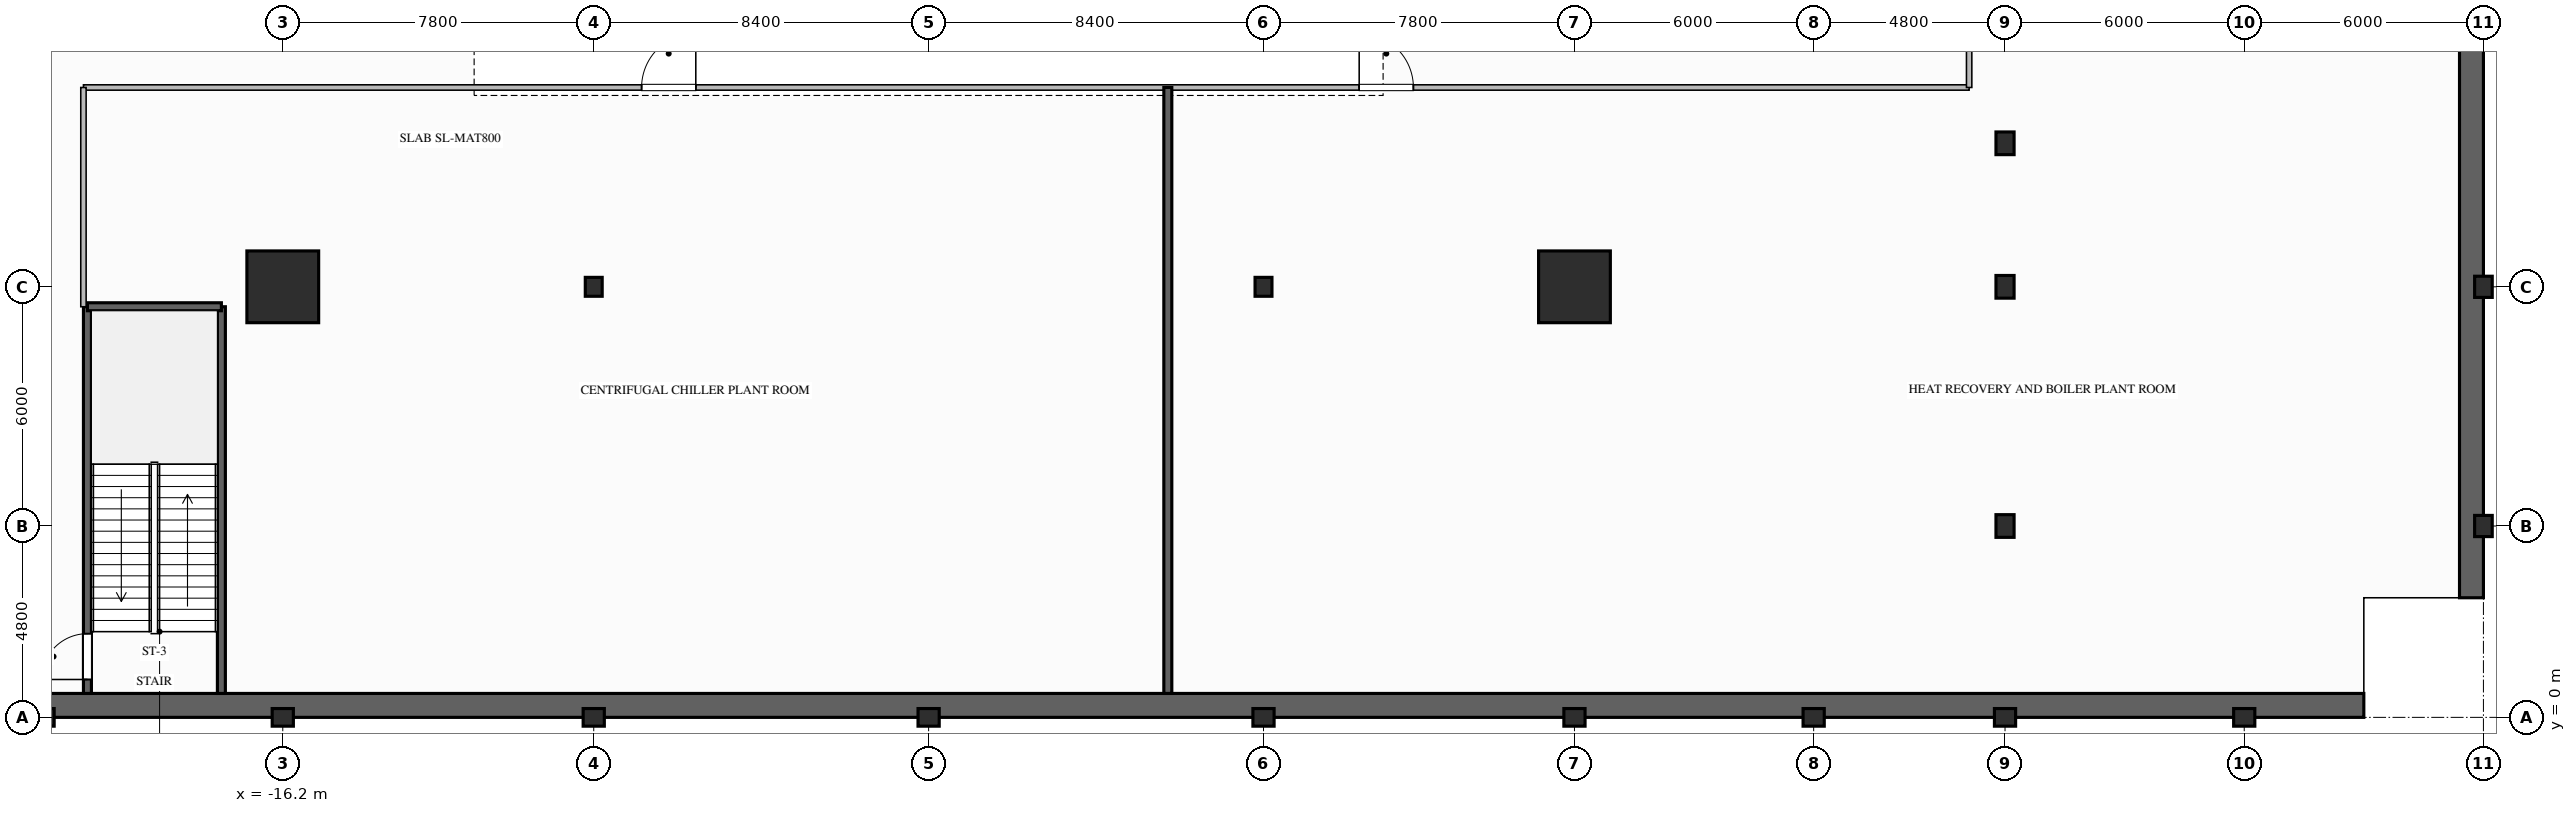
"""IFC4 building model, lengths in metres.
Left out: names, types, materials, properties, quantities, classifications, styles, units other than length and angle.
Written with IfcOpenShell. Run it as: python <this file> out.ifc"""

import sys

from ifc_helpers import new_model, si_unit, direction, frame, frame_2d, origin, origin_2d, place, context, subcontext, project, spatial, rectangle, i_section, extrude, element, fill, save


model = new_model("IFC4")
c1 = context("Model", 3, precision=1e-05, world=origin(), true_north=direction((0.0, 1.0)))
c2 = subcontext(c1, "Body", "Model", "MODEL_VIEW")
j1 = project(units=[si_unit("LENGTHUNIT", "METRE"), si_unit("PLANEANGLEUNIT", "RADIAN")], contexts=[c1])
p1 = place(None, origin())
s1 = spatial("IfcSite", under=j1, at=p1, CompositionType="ELEMENT")
p2 = place(p1, origin())
s2 = spatial("IfcBuilding", under=s1, at=p2, CompositionType="ELEMENT")
p3 = place(p2, frame((0.0, 0.0, -10.8)))
s3 = spatial("IfcBuildingStorey", under=s2, at=p3, CompositionType="ELEMENT", Elevation=-10.8)
p4 = place(p3, frame((38.7, 51.0, 0.0), z_axis=(0.0, 0.0, 1.0), x_axis=(0.0, -1.0, 0.0)))
e1 = element("IfcWall", 1, at=p4, inside=s3, PredefinedType="USERDEFINED", context=c2, shape_type="SweptSolid", body=[
    extrude(rectangle(XDim=48.0, YDim=0.6, at=frame_2d((24.0, 0.0))), origin(), (0.0, 0.0, 1.0), 5.05),
])
p5 = place(p3, frame((36.0, 0.3, 0.0), z_axis=(0.0, 0.0, 1.0), x_axis=(-1.0, 0.0, 0.0)))
e2 = element("IfcWall", 2, at=p5, inside=s3, PredefinedType="USERDEFINED", context=c2, shape_type="SweptSolid", body=[
    extrude(rectangle(XDim=60.0, YDim=0.6, at=frame_2d((30.0, 0.0))), origin(), (0.0, 0.0, 1.0), 5.05),
])
for number, where, z_axis, x_axis in (
    (3, (-16.2, 10.8, 0.0), (0.0, 0.0, 1.0), (1.0, 0.0, 0.0)),
    (4, (16.2, 10.8, 0.0), (0.0, 0.0, 1.0), (1.0, 0.0, 0.0)),
):
    element("IfcColumn", number, at=place(p3, frame(where, z_axis=z_axis, x_axis=x_axis)), inside=s3, PredefinedType="COLUMN", context=c2, shape_type="SweptSolid", body=[
        extrude(rectangle(XDim=1.8, YDim=1.8, at=origin_2d()), origin(), (0.0, 0.0, 1.0), 5.4),
    ])
for number, where, z_axis, x_axis in (
    (5, (39.0, 4.8, 0.0), (0.0, 0.0, 1.0), (1.0, 0.0, 0.0)),
    (6, (39.0, 10.8, 0.0), (0.0, 0.0, 1.0), (1.0, 0.0, 0.0)),
    (7, (-22.2, 0.0, 0.0), (0.0, 0.0, 1.0), (0.0, 1.0, 0.0)),
    (8, (-16.2, 0.0, 0.0), (0.0, 0.0, 1.0), (0.0, 1.0, 0.0)),
    (9, (-8.4, 0.0, 0.0), (0.0, 0.0, 1.0), (0.0, 1.0, 0.0)),
    (10, (0.0, 0.0, 0.0), (0.0, 0.0, 1.0), (0.0, 1.0, 0.0)),
    (11, (8.4, 0.0, 0.0), (0.0, 0.0, 1.0), (0.0, 1.0, 0.0)),
    (12, (16.2, 0.0, 0.0), (0.0, 0.0, 1.0), (0.0, 1.0, 0.0)),
    (13, (22.2, 0.0, 0.0), (0.0, 0.0, 1.0), (0.0, 1.0, 0.0)),
    (14, (27.0, 0.0, 0.0), (0.0, 0.0, 1.0), (0.0, 1.0, 0.0)),
    (15, (33.0, 0.0, 0.0), (0.0, 0.0, 1.0), (0.0, 1.0, 0.0)),
):
    element("IfcColumn", number, at=place(p3, frame(where, z_axis=z_axis, x_axis=x_axis)), inside=s3, PredefinedType="COLUMN", context=c2, shape_type="SweptSolid", body=[
        extrude(i_section(OverallWidth=0.442, OverallDepth=0.531, WebThickness=0.066, FlangeThickness=0.106, FilletRadius=0.03, at=origin_2d()), origin(), (0.0, 0.0, 1.0), 5.4),
    ])
for number, where, z_axis, x_axis in (
    (16, (27.0, 4.8, 0.0), (0.0, 0.0, 1.0), (1.0, 0.0, 0.0)),
    (17, (27.0, 10.8, 0.0), (0.0, 0.0, 1.0), (1.0, 0.0, 0.0)),
    (18, (27.0, 14.4, 0.0), (0.0, 0.0, 1.0), (1.0, 0.0, 0.0)),
):
    element("IfcColumn", number, at=place(p3, frame(where, z_axis=z_axis, x_axis=x_axis)), inside=s3, PredefinedType="COLUMN", context=c2, shape_type="SweptSolid", body=[
        extrude(i_section(OverallWidth=0.454, OverallDepth=0.569, WebThickness=0.078, FlangeThickness=0.125, FilletRadius=0.03, at=origin_2d()), origin(), (0.0, 0.0, 1.0), 5.4),
    ])
for number, where, z_axis, x_axis in (
    (19, (-8.4, 10.8, 0.0), (0.0, 0.0, 1.0), (1.0, 0.0, 0.0)),
    (20, (8.4, 10.8, 0.0), (0.0, 0.0, 1.0), (1.0, 0.0, 0.0)),
):
    element("IfcColumn", number, at=place(p3, frame(where, z_axis=z_axis, x_axis=x_axis)), inside=s3, PredefinedType="COLUMN", context=c2, shape_type="SweptSolid", body=[
        extrude(i_section(OverallWidth=0.424, OverallDepth=0.474, WebThickness=0.048, FlangeThickness=0.077, FilletRadius=0.03, at=origin_2d()), origin(), (0.0, 0.0, 1.0), 5.4),
    ])
p6 = place(p2, frame((0.0, 0.0, -5.4)))
s4 = spatial("IfcBuildingStorey", under=s2, at=p6, CompositionType="ELEMENT", Elevation=-5.4)
p7 = place(p6, frame((39.0, 3.45, -5.4), z_axis=(0.0, 0.0, 1.0), x_axis=(1.0, 0.0, 0.0)))
e21 = element("IfcWall", 21, at=p7, inside=s4, PredefinedType="USERDEFINED", context=c2, shape_type="SweptSolid", body=[
    extrude(rectangle(XDim=5.825, YDim=0.45, at=frame_2d((2.913, 0.0))), origin(), (0.0, 0.0, 1.0), 10.62),
])
p8 = place(p6, frame((35.55, -2.325, -5.4), z_axis=(0.0, 0.0, 1.0), x_axis=(0.0, 1.0, 0.0)))
e22 = element("IfcWall", 22, at=p8, inside=s4, PredefinedType="USERDEFINED", context=c2, shape_type="SweptSolid", body=[
    extrude(rectangle(XDim=2.325, YDim=0.45, at=frame_2d((1.163, 0.0))), origin(), (0.0, 0.0, 1.0), 10.62),
])
p9 = place(p3, frame((-21.1, 0.6, 0.0), z_axis=(0.0, 0.0, 1.0), x_axis=(0.0, 1.0, 0.0)))
e23 = element("IfcWall", 23, at=p9, inside=s3, PredefinedType="SOLIDWALL", context=c2, shape_type="SweptSolid", body=[
    extrude(rectangle(XDim=9.7, YDim=0.2, at=frame_2d((4.85, 0.0))), origin(), (0.0, 0.0, 1.0), 5.05),
])
p10 = place(p9, frame((0.35, 0.0, 0.0)))
e24 = element("IfcOpeningElement", 24, at=p10, cuts=e23, PredefinedType="OPENING", context=c2, shape_type="SweptSolid", body=[
    extrude(rectangle(XDim=1.15, YDim=2.15, at=frame_2d((0.575, 1.075))), frame((0.0, 0.11, 0.0), z_axis=(0.0, -1.0, 0.0), x_axis=(1.0, 0.0, 0.0)), (0.0, 0.0, 1.0), 0.22),
])
p11 = place(p3, frame((-17.74, 10.3, 0.0), z_axis=(0.0, 0.0, 1.0), x_axis=(0.0, -1.0, 0.0)))
e25 = element("IfcWall", 25, at=p11, inside=s3, PredefinedType="SOLIDWALL", context=c2, shape_type="SweptSolid", body=[
    extrude(rectangle(XDim=9.7, YDim=0.2, at=frame_2d((4.85, 0.0))), origin(), (0.0, 0.0, 1.0), 5.05),
])
p12 = place(p3, frame((-17.74, 10.3, 0.0), z_axis=(0.0, 0.0, 1.0), x_axis=(-1.0, 0.0, 0.0)))
e26 = element("IfcWall", 26, at=p12, inside=s3, PredefinedType="SOLIDWALL", context=c2, shape_type="SweptSolid", body=[
    extrude(rectangle(XDim=3.36, YDim=0.2, at=frame_2d((1.68, 0.0))), origin(), (0.0, 0.0, 1.0), 5.05),
])
p13 = place(p3, frame((-21.2, 15.8, 0.0), z_axis=(0.0, 0.0, 1.0), x_axis=(1.0, 0.0, 0.0)))
e27 = element("IfcWall", 27, at=p13, inside=s3, PredefinedType="PARTITIONING", context=c2, shape_type="SweptSolid", body=[
    extrude(rectangle(XDim=47.3, YDim=0.135, at=frame_2d((23.65, 0.0))), origin(), (0.0, 0.0, 1.0), 5.05),
])
p14 = place(p13, frame((14.0, 0.0, 0.0)))
e28 = element("IfcOpeningElement", 28, at=p14, cuts=e27, PredefinedType="OPENING", context=c2, shape_type="SweptSolid", body=[
    extrude(rectangle(XDim=1.36, YDim=2.2, at=frame_2d((0.68, 1.1))), frame((0.0, 0.077, 0.0), z_axis=(0.0, -1.0, 0.0), x_axis=(1.0, 0.0, 0.0)), (0.0, 0.0, 1.0), 0.155),
])
p15 = place(p13, frame((32.0, 0.0, 0.0)))
e29 = element("IfcOpeningElement", 29, at=p15, cuts=e27, PredefinedType="OPENING", context=c2, shape_type="SweptSolid", body=[
    extrude(rectangle(XDim=1.36, YDim=2.2, at=frame_2d((0.68, 1.1))), frame((0.0, 0.077, 0.0), z_axis=(0.0, -1.0, 0.0), x_axis=(1.0, 0.0, 0.0)), (0.0, 0.0, 1.0), 0.155),
])
p16 = place(p3, frame((-21.2, 10.3, 0.0), z_axis=(0.0, 0.0, 1.0), x_axis=(0.0, 1.0, 0.0)))
e30 = element("IfcWall", 30, at=p16, inside=s3, PredefinedType="PARTITIONING", context=c2, shape_type="SweptSolid", body=[
    extrude(rectangle(XDim=5.5, YDim=0.135, at=frame_2d((2.75, 0.0))), origin(), (0.0, 0.0, 1.0), 5.05),
])
p17 = place(p3, frame((26.1, 15.8, 0.0), z_axis=(0.0, 0.0, 1.0), x_axis=(0.0, 1.0, 0.0)))
e31 = element("IfcWall", 31, at=p17, inside=s3, PredefinedType="PARTITIONING", context=c2, shape_type="SweptSolid", body=[
    extrude(rectangle(XDim=34.6, YDim=0.135, at=frame_2d((17.3, 0.0))), origin(), (0.0, 0.0, 1.0), 5.05),
])
p18 = place(p17, frame((9.4, 0.0, 0.0)))
e32 = element("IfcOpeningElement", 32, at=p18, cuts=e31, PredefinedType="OPENING", context=c2, shape_type="SweptSolid", body=[
    extrude(rectangle(XDim=1.36, YDim=2.2, at=frame_2d((0.68, 1.1))), frame((0.0, 0.077, 0.0), z_axis=(0.0, -1.0, 0.0), x_axis=(1.0, 0.0, 0.0)), (0.0, 0.0, 1.0), 0.155),
])
p19 = place(p3, frame((6.0, 0.6, 0.0), z_axis=(0.0, 0.0, 1.0), x_axis=(0.0, 1.0, 0.0)))
e33 = element("IfcWall", 33, at=p19, inside=s3, PredefinedType="SOLIDWALL", context=c2, shape_type="SweptSolid", body=[
    extrude(rectangle(XDim=15.2, YDim=0.2, at=frame_2d((7.6, 0.0))), origin(), (0.0, 0.0, 1.0), 5.05),
])
p20 = place(p10, origin())
e34 = element("IfcDoor", 34, at=p20, inside=s3, OperationType="SINGLE_SWING_LEFT", PredefinedType="DOOR", context=c2, shape_type="SweptSolid", body=[
    extrude(rectangle(XDim=1.15, YDim=2.15, at=frame_2d((0.575, 1.075))), frame((0.0, 0.025, 0.0), z_axis=(0.0, -1.0, 0.0), x_axis=(1.0, 0.0, 0.0)), (0.0, 0.0, 1.0), 0.05),
])
fill(e24, e34)
p21 = place(p14, origin())
e35 = element("IfcDoor", 35, at=p21, inside=s3, OperationType="SINGLE_SWING_RIGHT", PredefinedType="DOOR", context=c2, shape_type="SweptSolid", body=[
    extrude(rectangle(XDim=1.36, YDim=2.2, at=frame_2d((0.68, 1.1))), frame((0.0, 0.025, 0.0), z_axis=(0.0, -1.0, 0.0), x_axis=(1.0, 0.0, 0.0)), (0.0, 0.0, 1.0), 0.05),
])
fill(e28, e35)
p22 = place(p15, origin())
e36 = element("IfcDoor", 36, at=p22, inside=s3, OperationType="SINGLE_SWING_LEFT", PredefinedType="DOOR", context=c2, shape_type="SweptSolid", body=[
    extrude(rectangle(XDim=1.36, YDim=2.2, at=frame_2d((0.68, 1.1))), frame((0.0, 0.025, 0.0), z_axis=(0.0, -1.0, 0.0), x_axis=(1.0, 0.0, 0.0)), (0.0, 0.0, 1.0), 0.05),
])
fill(e29, e36)
save(model, sys.argv[1])
